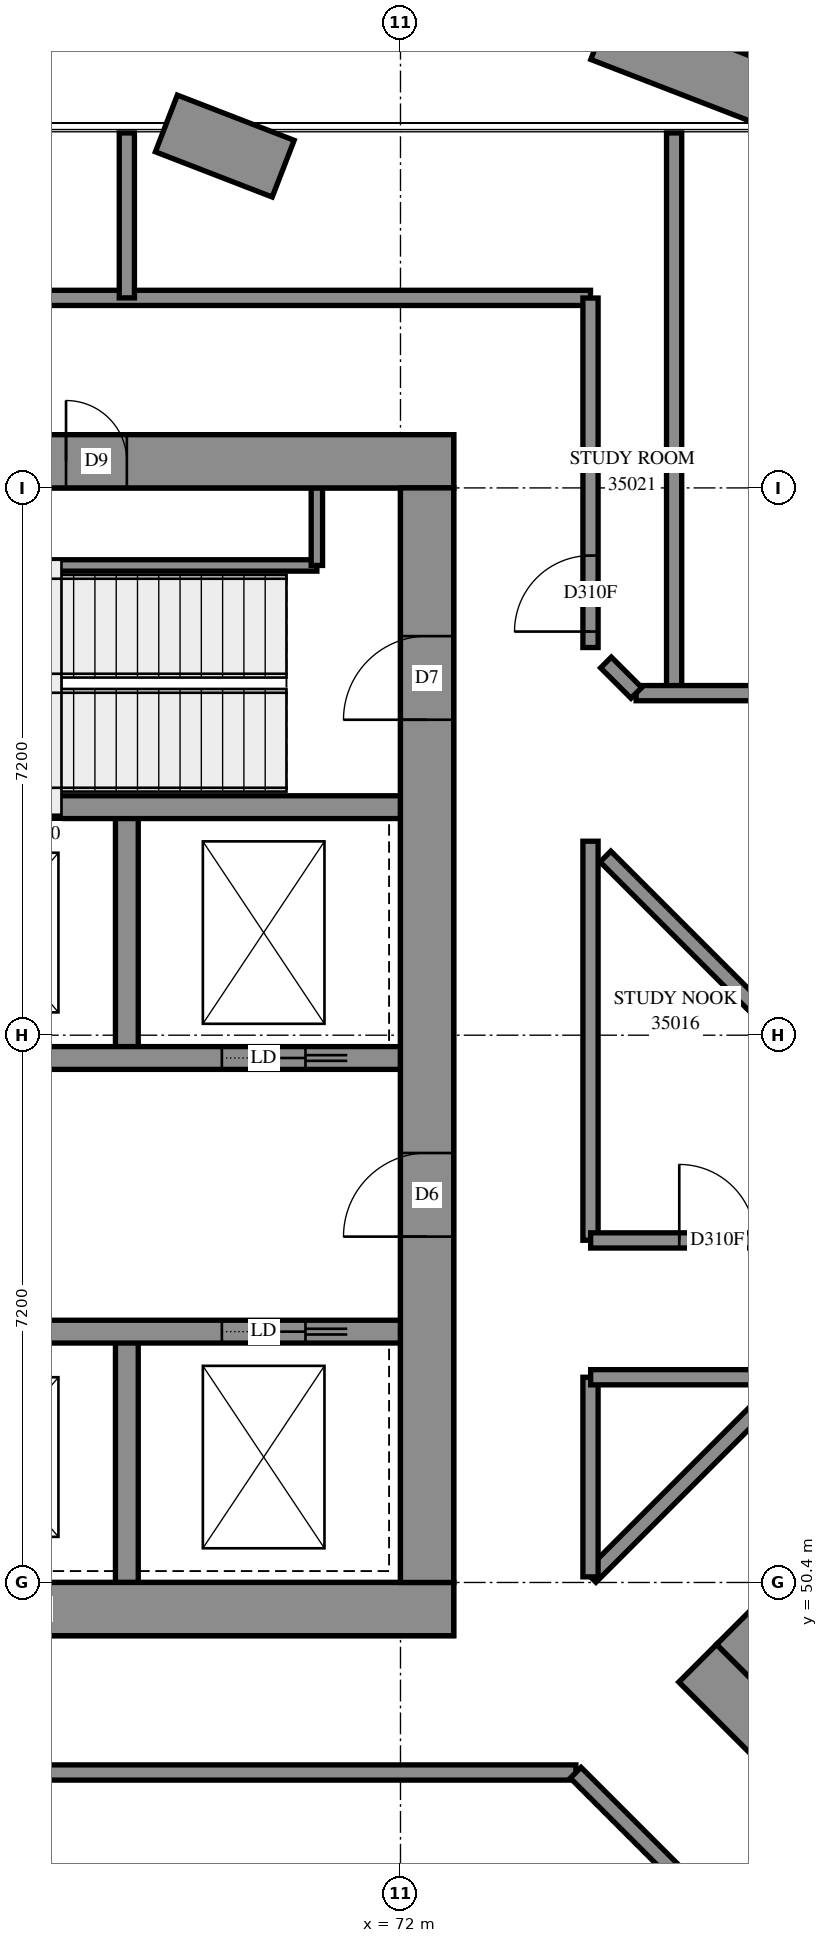
"""IFC4 building model, lengths in metres.
Left out: names, types, materials, properties, quantities, classifications, styles, units other than length and angle.
Written with IfcOpenShell. Run it as: python <this file> out.ifc"""

import sys

from ifc_helpers import new_model, si_unit, direction, frame, frame_2d, origin, place, context, subcontext, project, spatial, rectangle, extrude, element, fill, save


model = new_model("IFC4")
c1 = context("Model", 3, precision=1e-05, world=origin(), true_north=direction((0.0, 1.0)))
c2 = subcontext(c1, "Body", "Model", "MODEL_VIEW")
j1 = project(units=[si_unit("LENGTHUNIT", "METRE"), si_unit("PLANEANGLEUNIT", "RADIAN")], contexts=[c1])
p1 = place(None, origin())
s1 = spatial("IfcSite", under=j1, at=p1, CompositionType="ELEMENT")
p2 = place(p1, origin())
s2 = spatial("IfcBuilding", under=s1, at=p2, CompositionType="ELEMENT")
p3 = place(p2, frame((0.0, 0.0, 131.2)))
s3 = spatial("IfcBuildingStorey", under=s2, at=p3, CompositionType="ELEMENT", Elevation=131.2)
p4 = place(p3, frame((56.9, 50.05, -0.3), z_axis=(0.0, 0.0, 1.0), x_axis=(1.0, 0.0, 0.0)))
e1 = element("IfcWall", 1, at=p4, inside=s3, PredefinedType="SHEAR", context=c2, shape_type="SweptSolid", body=[
    extrude(rectangle(XDim=15.8, YDim=0.7, at=frame_2d((7.9, 0.0))), origin(), (0.0, 0.0, 1.0), 3.5),
])
p5 = place(p3, frame((56.9, 65.15, -0.3), z_axis=(0.0, 0.0, 1.0), x_axis=(1.0, 0.0, 0.0)))
e2 = element("IfcWall", 2, at=p5, inside=s3, PredefinedType="SHEAR", context=c2, shape_type="SweptSolid", body=[
    extrude(rectangle(XDim=15.8, YDim=0.7, at=frame_2d((7.9, 0.0))), origin(), (0.0, 0.0, 1.0), 3.5),
])
p6 = place(p5, frame((10.7, 0.0, 0.3)))
e3 = element("IfcOpeningElement", 3, at=p6, cuts=e2, PredefinedType="OPENING", context=c2, shape_type="SweptSolid", body=[
    extrude(rectangle(XDim=0.8, YDim=2.1, at=frame_2d((0.4, 1.05))), frame((0.0, 0.36, 0.0), z_axis=(0.0, -1.0, 0.0), x_axis=(1.0, 0.0, 0.0)), (0.0, 0.0, 1.0), 0.72),
])
p7 = place(p3, frame((72.35, 50.4, -0.3), z_axis=(0.0, 0.0, 1.0), x_axis=(0.0, 1.0, 0.0)))
e4 = element("IfcWall", 4, at=p7, inside=s3, PredefinedType="SHEAR", context=c2, shape_type="SweptSolid", body=[
    extrude(rectangle(XDim=14.4, YDim=0.7, at=frame_2d((7.2, 0.0))), origin(), (0.0, 0.0, 1.0), 3.5),
])
p8 = place(p7, frame((4.55, 0.0, 0.3)))
e5 = element("IfcOpeningElement", 5, at=p8, cuts=e4, PredefinedType="OPENING", context=c2, shape_type="SweptSolid", body=[
    extrude(rectangle(XDim=1.1, YDim=2.1, at=frame_2d((0.55, 1.05))), frame((0.0, 0.36, 0.0), z_axis=(0.0, -1.0, 0.0), x_axis=(1.0, 0.0, 0.0)), (0.0, 0.0, 1.0), 0.72),
])
p9 = place(p7, frame((11.35, 0.0, 0.3)))
e6 = element("IfcOpeningElement", 6, at=p9, cuts=e4, PredefinedType="OPENING", context=c2, shape_type="SweptSolid", body=[
    extrude(rectangle(XDim=1.1, YDim=2.1, at=frame_2d((0.55, 1.05))), frame((0.0, 0.36, 0.0), z_axis=(0.0, -1.0, 0.0), x_axis=(1.0, 0.0, 0.0)), (0.0, 0.0, 1.0), 0.72),
])
for number, where, z_axis, x_axis in (
    (7, (68.4, 50.4, 0.0), (0.0, 0.0, 1.0), (0.0, 1.0, 0.0)),
    (8, (68.4, 57.3, 0.0), (0.0, 0.0, 1.0), (0.0, 1.0, 0.0)),
):
    element("IfcWall", number, at=place(p3, frame(where, z_axis=z_axis, x_axis=x_axis)), inside=s3, PredefinedType="SOLIDWALL", context=c2, shape_type="SweptSolid", body=[
        extrude(rectangle(XDim=3.3, YDim=0.3, at=frame_2d((1.65, 0.0))), origin(), (0.0, 0.0, 1.0), 3.9),
    ])
p10 = place(p3, frame((57.6, 53.7, 0.0), z_axis=(0.0, 0.0, 1.0), x_axis=(1.0, 0.0, 0.0)))
e9 = element("IfcWall", 9, at=p10, inside=s3, PredefinedType="SOLIDWALL", context=c2, shape_type="SweptSolid", body=[
    extrude(rectangle(XDim=14.4, YDim=0.3, at=frame_2d((7.2, 0.0))), origin(), (0.0, 0.0, 1.0), 3.9),
])
p11 = place(p10, frame((1.25, 0.0, 0.0)))
e10 = element("IfcOpeningElement", 10, at=p11, cuts=e9, PredefinedType="OPENING", context=c2, shape_type="SweptSolid", body=[
    extrude(rectangle(XDim=1.1, YDim=2.1, at=frame_2d((0.55, 1.05))), frame((0.0, 0.16, 0.0), z_axis=(0.0, -1.0, 0.0), x_axis=(1.0, 0.0, 0.0)), (0.0, 0.0, 1.0), 0.32),
])
p12 = place(p10, frame((4.85, 0.0, 0.0)))
e11 = element("IfcOpeningElement", 11, at=p12, cuts=e9, PredefinedType="OPENING", context=c2, shape_type="SweptSolid", body=[
    extrude(rectangle(XDim=1.1, YDim=2.1, at=frame_2d((0.55, 1.05))), frame((0.0, 0.16, 0.0), z_axis=(0.0, -1.0, 0.0), x_axis=(1.0, 0.0, 0.0)), (0.0, 0.0, 1.0), 0.32),
])
p13 = place(p10, frame((8.45, 0.0, 0.0)))
e12 = element("IfcOpeningElement", 12, at=p13, cuts=e9, PredefinedType="OPENING", context=c2, shape_type="SweptSolid", body=[
    extrude(rectangle(XDim=1.1, YDim=2.1, at=frame_2d((0.55, 1.05))), frame((0.0, 0.16, 0.0), z_axis=(0.0, -1.0, 0.0), x_axis=(1.0, 0.0, 0.0)), (0.0, 0.0, 1.0), 0.32),
])
p14 = place(p10, frame((12.05, 0.0, 0.0)))
e13 = element("IfcOpeningElement", 13, at=p14, cuts=e9, PredefinedType="OPENING", context=c2, shape_type="SweptSolid", body=[
    extrude(rectangle(XDim=1.1, YDim=2.1, at=frame_2d((0.55, 1.05))), frame((0.0, 0.16, 0.0), z_axis=(0.0, -1.0, 0.0), x_axis=(1.0, 0.0, 0.0)), (0.0, 0.0, 1.0), 0.32),
])
p15 = place(p3, frame((57.6, 57.3, 0.0), z_axis=(0.0, 0.0, 1.0), x_axis=(1.0, 0.0, 0.0)))
e14 = element("IfcWall", 14, at=p15, inside=s3, PredefinedType="SOLIDWALL", context=c2, shape_type="SweptSolid", body=[
    extrude(rectangle(XDim=14.4, YDim=0.3, at=frame_2d((7.2, 0.0))), origin(), (0.0, 0.0, 1.0), 3.9),
])
p16 = place(p15, frame((1.25, 0.0, 0.0)))
e15 = element("IfcOpeningElement", 15, at=p16, cuts=e14, PredefinedType="OPENING", context=c2, shape_type="SweptSolid", body=[
    extrude(rectangle(XDim=1.1, YDim=2.1, at=frame_2d((0.55, 1.05))), frame((0.0, 0.16, 0.0), z_axis=(0.0, -1.0, 0.0), x_axis=(1.0, 0.0, 0.0)), (0.0, 0.0, 1.0), 0.32),
])
p17 = place(p15, frame((4.85, 0.0, 0.0)))
e16 = element("IfcOpeningElement", 16, at=p17, cuts=e14, PredefinedType="OPENING", context=c2, shape_type="SweptSolid", body=[
    extrude(rectangle(XDim=1.1, YDim=2.1, at=frame_2d((0.55, 1.05))), frame((0.0, 0.16, 0.0), z_axis=(0.0, -1.0, 0.0), x_axis=(1.0, 0.0, 0.0)), (0.0, 0.0, 1.0), 0.32),
])
p18 = place(p15, frame((8.45, 0.0, 0.0)))
e17 = element("IfcOpeningElement", 17, at=p18, cuts=e14, PredefinedType="OPENING", context=c2, shape_type="SweptSolid", body=[
    extrude(rectangle(XDim=1.1, YDim=2.1, at=frame_2d((0.55, 1.05))), frame((0.0, 0.16, 0.0), z_axis=(0.0, -1.0, 0.0), x_axis=(1.0, 0.0, 0.0)), (0.0, 0.0, 1.0), 0.32),
])
p19 = place(p15, frame((12.05, 0.0, 0.0)))
e18 = element("IfcOpeningElement", 18, at=p19, cuts=e14, PredefinedType="OPENING", context=c2, shape_type="SweptSolid", body=[
    extrude(rectangle(XDim=1.1, YDim=2.1, at=frame_2d((0.55, 1.05))), frame((0.0, 0.16, 0.0), z_axis=(0.0, -1.0, 0.0), x_axis=(1.0, 0.0, 0.0)), (0.0, 0.0, 1.0), 0.32),
])
p20 = place(p3, frame((64.8, 60.6, 0.0), z_axis=(0.0, 0.0, 1.0), x_axis=(1.0, 0.0, 0.0)))
e19 = element("IfcWall", 19, at=p20, inside=s3, PredefinedType="SOLIDWALL", context=c2, shape_type="SweptSolid", body=[
    extrude(rectangle(XDim=7.2, YDim=0.3, at=frame_2d((3.6, 0.0))), origin(), (0.0, 0.0, 1.0), 3.9),
])
p21 = place(p3, frame((75.912, 49.337, -0.3), z_axis=(0.0, 0.0, 1.0), x_axis=(0.7071036166, -0.7071099457, 0.0)))
e20 = element("IfcWall", 20, at=p21, inside=s3, PredefinedType="SHEAR", context=c2, shape_type="SweptSolid", body=[
    extrude(rectangle(XDim=15.8, YDim=0.7, at=frame_2d((7.9, 0.0))), origin(), (0.0, 0.0, 1.0), 3.5),
])
p22 = place(p3, frame((76.407, 49.337, -0.3), z_axis=(0.0, 0.0, 1.0), x_axis=(0.7071067812, 0.7071067812, 0.0)))
e21 = element("IfcWall", 21, at=p22, inside=s3, PredefinedType="SHEAR", context=c2, shape_type="SweptSolid", body=[
    extrude(rectangle(XDim=14.4, YDim=0.7, at=frame_2d((7.2, 0.0))), origin(), (0.0, 0.0, 1.0), 3.5),
])
p23 = place(p22, frame((4.55, 0.0, 0.3)))
e22 = element("IfcOpeningElement", 22, at=p23, cuts=e21, PredefinedType="OPENING", context=c2, shape_type="SweptSolid", body=[
    extrude(rectangle(XDim=1.1, YDim=2.1, at=frame_2d((0.55, 1.05))), frame((0.0, 0.36, 0.0), z_axis=(0.0, -1.0, 0.0), x_axis=(1.0, 0.0, 0.0)), (0.0, 0.0, 1.0), 0.72),
])
p24 = place(p22, frame((11.35, 0.0, 0.3)))
e23 = element("IfcOpeningElement", 23, at=p24, cuts=e21, PredefinedType="OPENING", context=c2, shape_type="SweptSolid", body=[
    extrude(rectangle(XDim=1.1, YDim=2.1, at=frame_2d((0.55, 1.05))), frame((0.0, 0.36, 0.0), z_axis=(0.0, -1.0, 0.0), x_axis=(1.0, 0.0, 0.0)), (0.0, 0.0, 1.0), 0.72),
])
p25 = place(p3, frame((81.193, 68.277, 0.0), z_axis=(0.0, 0.0, 1.0), x_axis=(-0.9326194654, 0.3608613761, 0.0)))
e24 = element("IfcWall", 24, at=p25, inside=s3, PredefinedType="SOLIDWALL", context=c2, shape_type="SweptSolid", body=[
    extrude(rectangle(XDim=7.018, YDim=0.8, at=frame_2d((3.509, 0.0))), origin(), (0.0, 0.0, 1.0), 0.65),
])
p26 = place(p3, frame((70.457, 69.0, 0.0), z_axis=(0.0, 0.0, 1.0), x_axis=(-0.9326148784, 0.3608732306, 0.0)))
e25 = element("IfcWall", 25, at=p26, inside=s3, PredefinedType="SOLIDWALL", context=c2, shape_type="SweptSolid", body=[
    extrude(rectangle(XDim=1.648, YDim=0.8, at=frame_2d((0.824, 0.0))), origin(), (0.0, 0.0, 1.0), 0.65),
])
p27 = place(p3, frame((64.95, 63.78, 0.0), z_axis=(0.0, 0.0, 1.0), x_axis=(1.0, 0.0, 0.0)))
e26 = element("IfcWall", 26, at=p27, inside=s3, PredefinedType="PARTITIONING", context=c2, shape_type="SweptSolid", body=[
    extrude(rectangle(XDim=5.95, YDim=0.15, at=frame_2d((2.975, 0.0))), origin(), (0.0, 0.0, 1.0), 3.9),
])
p28 = place(p3, frame((70.9, 63.78, 0.0), z_axis=(0.0, 0.0, 1.0), x_axis=(0.0, 1.0, 0.0)))
e27 = element("IfcWall", 27, at=p28, inside=s3, PredefinedType="PARTITIONING", context=c2, shape_type="SweptSolid", body=[
    extrude(rectangle(XDim=1.02, YDim=0.15, at=frame_2d((0.51, 0.0))), origin(), (0.0, 0.0, 1.0), 3.9),
])
p29 = place(p3, frame((55.102, 67.3, 0.0), z_axis=(0.0, 0.0, 1.0), x_axis=(1.0, 0.0, 0.0)))
e28 = element("IfcWall", 28, at=p29, inside=s3, PredefinedType="PARTITIONING", context=c2, shape_type="SweptSolid", body=[
    extrude(rectangle(XDim=19.398, YDim=0.2, at=frame_2d((9.699, 0.0))), origin(), (0.0, 0.0, 1.0), 3.9),
])
p30 = place(p29, frame((8.435, 0.0, 0.0)))
e29 = element("IfcOpeningElement", 29, at=p30, cuts=e28, PredefinedType="OPENING", context=c2, shape_type="SweptSolid", body=[
    extrude(rectangle(XDim=1.0, YDim=2.1, at=frame_2d((0.5, 1.05))), frame((0.0, 0.11, 0.0), z_axis=(0.0, -1.0, 0.0), x_axis=(1.0, 0.0, 0.0)), (0.0, 0.0, 1.0), 0.22),
])
p31 = place(p3, frame((55.1, 47.9, 0.0), z_axis=(0.0, 0.0, 1.0), x_axis=(1.0, 0.0, 0.0)))
e30 = element("IfcWall", 30, at=p31, inside=s3, PredefinedType="PARTITIONING", context=c2, shape_type="SweptSolid", body=[
    extrude(rectangle(XDim=19.208, YDim=0.2, at=frame_2d((9.604, 0.0))), origin(), (0.0, 0.0, 1.0), 3.9),
])
p32 = place(p3, frame((75.6, 62.1, 0.0), z_axis=(0.0, 0.0, 1.0), x_axis=(0.0, 1.0, 0.0)))
e31 = element("IfcWall", 31, at=p32, inside=s3, PredefinedType="PARTITIONING", context=c2, shape_type="SweptSolid", body=[
    extrude(rectangle(XDim=7.37, YDim=0.2, at=frame_2d((3.685, 0.0))), origin(), (0.0, 0.0, 1.0), 3.9),
])
p33 = place(p3, frame((74.5, 54.902, 0.0), z_axis=(0.0, 0.0, 1.0), x_axis=(0.0, 1.0, 0.0)))
e32 = element("IfcWall", 32, at=p33, inside=s3, PredefinedType="PARTITIONING", context=c2, shape_type="SweptSolid", body=[
    extrude(rectangle(XDim=5.25, YDim=0.2, at=frame_2d((2.625, 0.0))), origin(), (0.0, 0.0, 1.0), 3.9),
])
p34 = place(p3, frame((74.5, 62.7, 0.0), z_axis=(0.0, 0.0, 1.0), x_axis=(0.0, 1.0, 0.0)))
e33 = element("IfcWall", 33, at=p34, inside=s3, PredefinedType="PARTITIONING", context=c2, shape_type="SweptSolid", body=[
    extrude(rectangle(XDim=4.598, YDim=0.2, at=frame_2d((2.299, 0.0))), origin(), (0.0, 0.0, 1.0), 3.9),
])
p35 = place(p34, frame((0.21, 0.0, 0.0)))
e34 = element("IfcOpeningElement", 34, at=p35, cuts=e33, PredefinedType="OPENING", context=c2, shape_type="SweptSolid", body=[
    extrude(rectangle(XDim=1.0, YDim=2.1, at=frame_2d((0.5, 1.05))), frame((0.0, 0.11, 0.0), z_axis=(0.0, -1.0, 0.0), x_axis=(1.0, 0.0, 0.0)), (0.0, 0.0, 1.0), 0.22),
])
p36 = place(p3, frame((74.502, 54.9, 0.0), z_axis=(0.0, 0.0, 1.0), x_axis=(1.0, 0.0, 0.0)))
e35 = element("IfcWall", 35, at=p36, inside=s3, PredefinedType="PARTITIONING", context=c2, shape_type="SweptSolid", body=[
    extrude(rectangle(XDim=4.426, YDim=0.2, at=frame_2d((2.213, 0.0))), origin(), (0.0, 0.0, 1.0), 3.9),
])
p37 = place(p36, frame((1.166, 0.0, 0.0)))
e36 = element("IfcOpeningElement", 36, at=p37, cuts=e35, PredefinedType="OPENING", context=c2, shape_type="SweptSolid", body=[
    extrude(rectangle(XDim=1.0, YDim=2.1, at=frame_2d((0.5, 1.05))), frame((0.0, 0.11, 0.0), z_axis=(0.0, -1.0, 0.0), x_axis=(1.0, 0.0, 0.0)), (0.0, 0.0, 1.0), 0.22),
])
p38 = place(p3, frame((75.1, 62.1, 0.0), z_axis=(0.0, 0.0, 1.0), x_axis=(1.0, 0.0, 0.0)))
e37 = element("IfcWall", 37, at=p38, inside=s3, PredefinedType="PARTITIONING", context=c2, shape_type="SweptSolid", body=[
    extrude(rectangle(XDim=4.1, YDim=0.2, at=frame_2d((2.05, 0.0))), origin(), (0.0, 0.0, 1.0), 3.9),
])
p39 = place(p3, frame((74.697, 59.951, 0.0), z_axis=(0.0, 0.0, 1.0), x_axis=(0.7071067812, -0.7071067812, 0.0)))
e38 = element("IfcWall", 38, at=p39, inside=s3, PredefinedType="PARTITIONING", context=c2, shape_type="SweptSolid", body=[
    extrude(rectangle(XDim=3.889, YDim=0.2, at=frame_2d((1.945, 0.0))), origin(), (0.0, 0.0, 1.0), 3.9),
])
p40 = place(p3, frame((74.501, 50.473, 0.0), z_axis=(0.0, 0.0, 1.0), x_axis=(0.7071067812, 0.7071067812, 0.0)))
e39 = element("IfcWall", 39, at=p40, inside=s3, PredefinedType="PARTITIONING", context=c2, shape_type="SweptSolid", body=[
    extrude(rectangle(XDim=3.714, YDim=0.2, at=frame_2d((1.857, 0.0))), origin(), (0.0, 0.0, 1.0), 3.9),
])
p41 = place(p3, frame((74.305, 47.897, 0.0), z_axis=(0.0, 0.0, 1.0), x_axis=(0.7071067812, -0.7071067812, 0.0)))
e40 = element("IfcWall", 40, at=p41, inside=s3, PredefinedType="PARTITIONING", context=c2, shape_type="SweptSolid", body=[
    extrude(rectangle(XDim=3.069, YDim=0.2, at=frame_2d((1.534, 0.0))), origin(), (0.0, 0.0, 1.0), 3.9),
])
p42 = place(p3, frame((74.5, 50.474, 0.0), z_axis=(0.0, 0.0, 1.0), x_axis=(0.0, 1.0, 0.0)))
e41 = element("IfcWall", 41, at=p42, inside=s3, PredefinedType="PARTITIONING", context=c2, shape_type="SweptSolid", body=[
    extrude(rectangle(XDim=2.626, YDim=0.2, at=frame_2d((1.313, 0.0))), origin(), (0.0, 0.0, 1.0), 3.9),
])
p43 = place(p3, frame((74.502, 53.1, 0.0), z_axis=(0.0, 0.0, 1.0), x_axis=(1.0, 0.0, 0.0)))
e42 = element("IfcWall", 42, at=p43, inside=s3, PredefinedType="PARTITIONING", context=c2, shape_type="SweptSolid", body=[
    extrude(rectangle(XDim=2.624, YDim=0.2, at=frame_2d((1.312, 0.0))), origin(), (0.0, 0.0, 1.0), 3.9),
])
p44 = place(p3, frame((68.4, 67.3, 0.0), z_axis=(0.0, 0.0, 1.0), x_axis=(0.0, 1.0, 0.0)))
e43 = element("IfcWall", 43, at=p44, inside=s3, PredefinedType="PARTITIONING", context=c2, shape_type="SweptSolid", body=[
    extrude(rectangle(XDim=2.17, YDim=0.2, at=frame_2d((1.085, 0.0))), origin(), (0.0, 0.0, 1.0), 3.9),
])
p45 = place(p3, frame((74.704, 62.504, 0.0), z_axis=(0.0, 0.0, 1.0), x_axis=(0.7071067812, -0.7071067812, 0.0)))
e44 = element("IfcWall", 44, at=p45, inside=s3, PredefinedType="PARTITIONING", context=c2, shape_type="SweptSolid", body=[
    extrude(rectangle(XDim=0.566, YDim=0.2, at=frame_2d((0.283, 0.0))), origin(), (0.0, 0.0, 1.0), 3.9),
])
p46 = place(p6, origin())
e45 = element("IfcDoor", 45, at=p46, inside=s3, OperationType="SINGLE_SWING_RIGHT", PredefinedType="DOOR", context=c2, shape_type="SweptSolid", body=[
    extrude(rectangle(XDim=0.8, YDim=2.1, at=frame_2d((0.4, 1.05))), frame((0.0, -0.29, 0.0), z_axis=(0.0, -1.0, 0.0), x_axis=(1.0, 0.0, 0.0)), (0.0, 0.0, 1.0), 0.05),
])
fill(e3, e45)
p47 = place(p8, origin())
e46 = element("IfcDoor", 46, at=p47, inside=s3, OperationType="DOUBLE_DOOR_SINGLE_SWING", PredefinedType="DOOR", context=c2, shape_type="SweptSolid", body=[
    extrude(rectangle(XDim=1.1, YDim=2.1, at=frame_2d((0.55, 1.05))), frame((0.0, 0.025, 0.0), z_axis=(0.0, -1.0, 0.0), x_axis=(1.0, 0.0, 0.0)), (0.0, 0.0, 1.0), 0.05),
])
fill(e5, e46)
p48 = place(p9, origin())
e47 = element("IfcDoor", 47, at=p48, inside=s3, OperationType="SINGLE_SWING_RIGHT", PredefinedType="DOOR", context=c2, shape_type="SweptSolid", body=[
    extrude(rectangle(XDim=1.1, YDim=2.1, at=frame_2d((0.55, 1.05))), frame((0.0, 0.025, 0.0), z_axis=(0.0, -1.0, 0.0), x_axis=(1.0, 0.0, 0.0)), (0.0, 0.0, 1.0), 0.05),
])
fill(e6, e47)
p49 = place(p14, origin())
e48 = element("IfcDoor", 48, at=p49, inside=s3, OperationType="SLIDING_TO_RIGHT", PredefinedType="DOOR", context=c2, shape_type="SweptSolid", body=[
    extrude(rectangle(XDim=1.1, YDim=2.1, at=frame_2d((0.55, 1.05))), frame((0.0, 0.025, 0.0), z_axis=(0.0, -1.0, 0.0), x_axis=(1.0, 0.0, 0.0)), (0.0, 0.0, 1.0), 0.05),
])
fill(e13, e48)
p50 = place(p19, origin())
e49 = element("IfcDoor", 49, at=p50, inside=s3, OperationType="SLIDING_TO_RIGHT", PredefinedType="DOOR", context=c2, shape_type="SweptSolid", body=[
    extrude(rectangle(XDim=1.1, YDim=2.1, at=frame_2d((0.55, 1.05))), frame((0.0, 0.025, 0.0), z_axis=(0.0, -1.0, 0.0), x_axis=(1.0, 0.0, 0.0)), (0.0, 0.0, 1.0), 0.05),
])
fill(e18, e49)
p51 = place(p37, origin())
e50 = element("IfcDoor", 50, at=p51, inside=s3, OperationType="SINGLE_SWING_LEFT", PredefinedType="DOOR", context=c2, shape_type="SweptSolid", body=[
    extrude(rectangle(XDim=1.0, YDim=2.1, at=frame_2d((0.5, 1.05))), frame((0.0, 0.025, 0.0), z_axis=(0.0, -1.0, 0.0), x_axis=(1.0, 0.0, 0.0)), (0.0, 0.0, 1.0), 0.05),
])
fill(e36, e50)
p52 = place(p35, origin())
e51 = element("IfcDoor", 51, at=p52, inside=s3, OperationType="SINGLE_SWING_LEFT", PredefinedType="DOOR", context=c2, shape_type="SweptSolid", body=[
    extrude(rectangle(XDim=1.0, YDim=2.1, at=frame_2d((0.5, 1.05))), frame((0.0, 0.025, 0.0), z_axis=(0.0, -1.0, 0.0), x_axis=(1.0, 0.0, 0.0)), (0.0, 0.0, 1.0), 0.05),
])
fill(e34, e51)
save(model, sys.argv[1])
